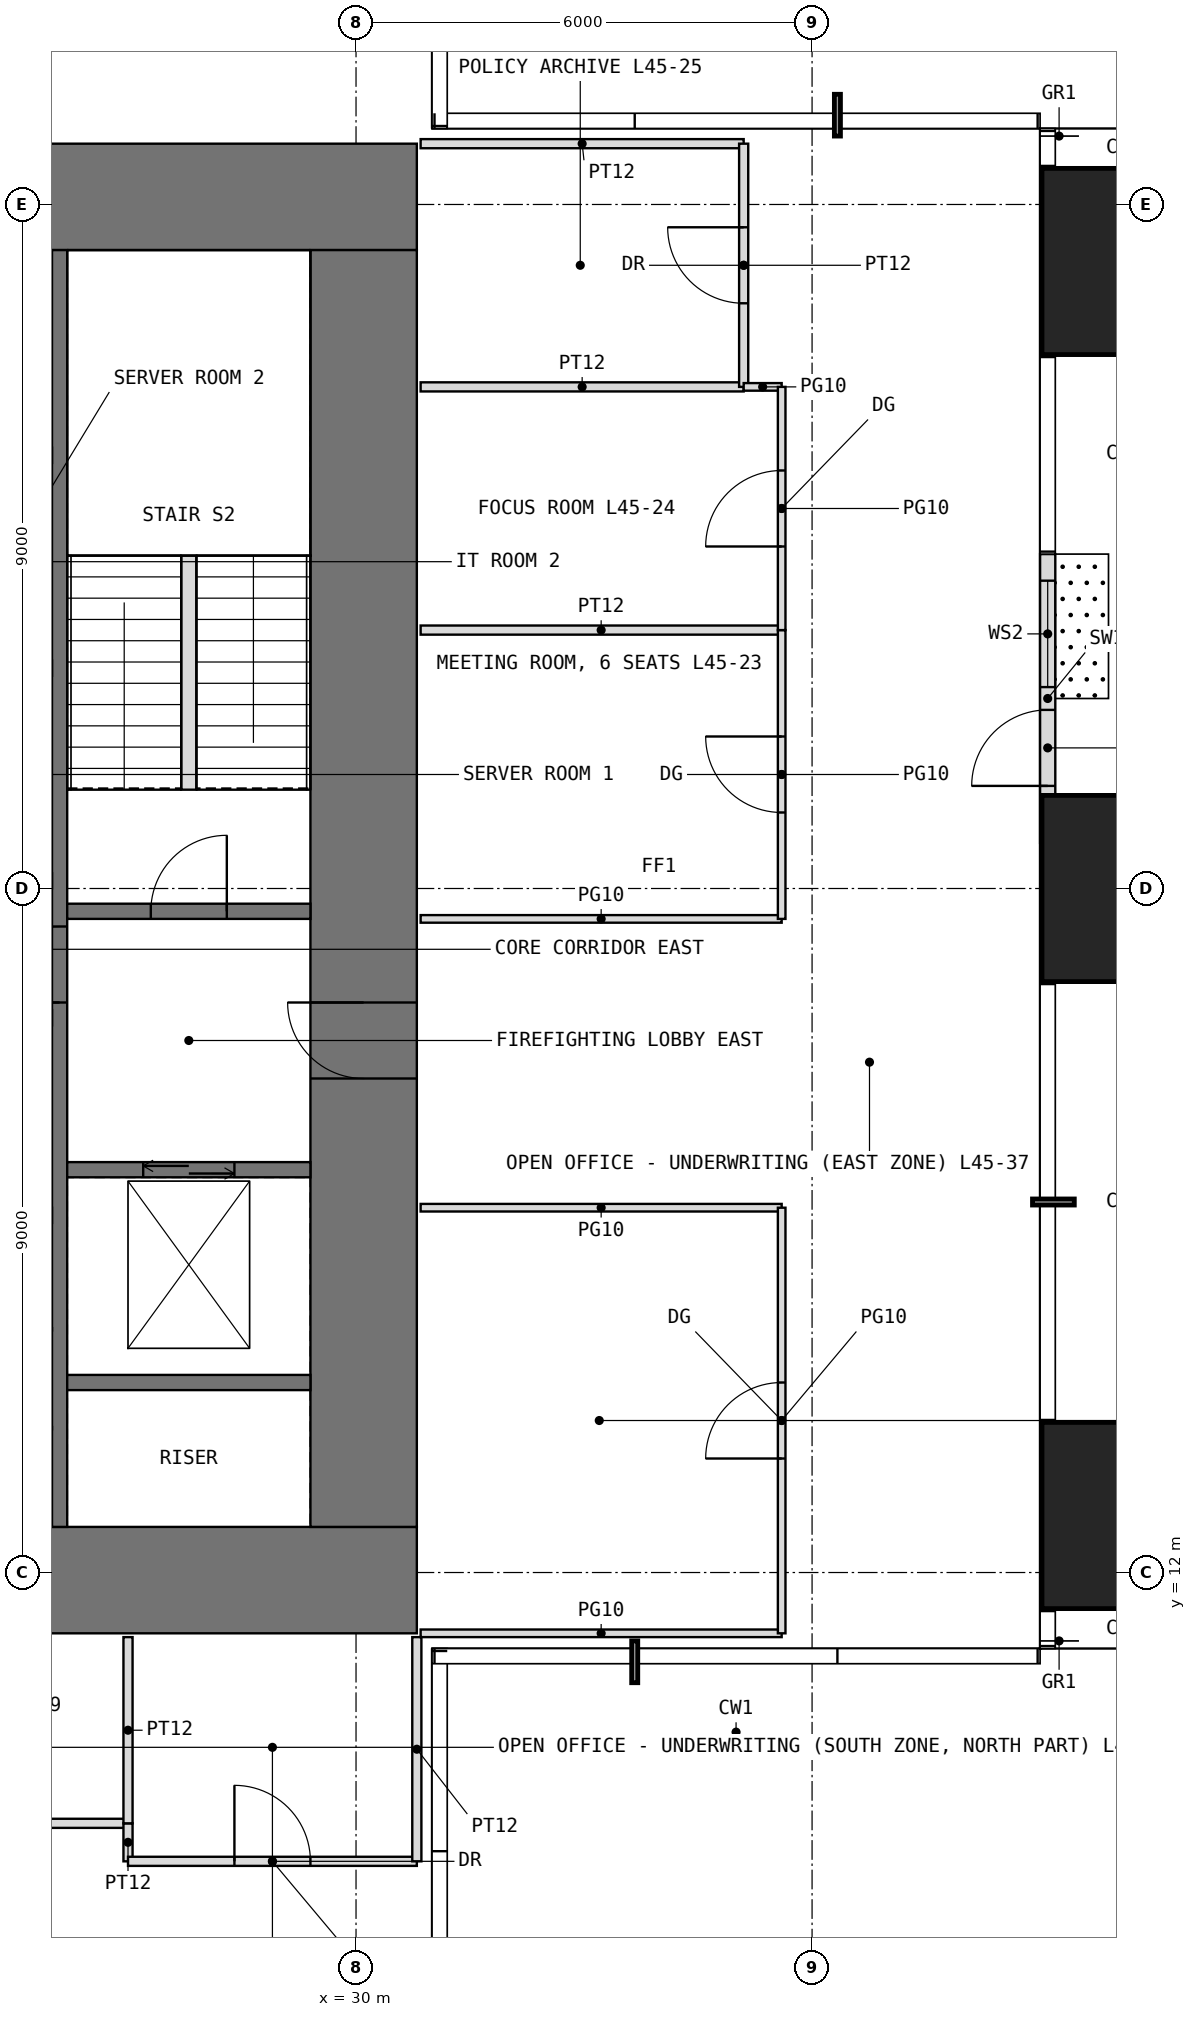
"""IFC4 building model, lengths in metres.
Left out: names, types, materials, properties, quantities, classifications, styles, units other than length and angle.
Written with IfcOpenShell. Run it as: python <this file> out.ifc"""

import sys

from ifc_helpers import new_model, si_unit, direction, frame, frame_2d, origin, origin_2d, place, context, subcontext, project, spatial, rectangle, extrude, element, fill, save


model = new_model("IFC4")
c1 = context("Model", 3, precision=1e-05, world=origin(), true_north=direction((0.0, 1.0)))
c2 = subcontext(c1, "Body", "Model", "MODEL_VIEW")
j1 = project(units=[si_unit("LENGTHUNIT", "METRE"), si_unit("PLANEANGLEUNIT", "RADIAN")], contexts=[c1])
p1 = place(None, origin())
s1 = spatial("IfcSite", under=j1, at=p1, CompositionType="ELEMENT")
p2 = place(p1, origin())
s2 = spatial("IfcBuilding", under=s1, at=p2, CompositionType="ELEMENT")
p3 = place(p2, frame((0.0, 0.0, 190.5)))
s3 = spatial("IfcBuildingStorey", under=s2, at=p3, CompositionType="ELEMENT", Elevation=190.5)
for number, where, z_axis, x_axis in (
    (1, (40.25, 12.75, 0.0), (0.0, 0.0, 1.0), (1.0, 0.0, 0.0)),
    (2, (40.25, 21.0, 0.0), (0.0, 0.0, 1.0), (1.0, 0.0, 0.0)),
    (3, (40.25, 29.25, 0.0), (0.0, 0.0, 1.0), (1.0, 0.0, 0.0)),
):
    element("IfcColumn", number, at=place(p3, frame(where, z_axis=z_axis, x_axis=x_axis)), inside=s3, PredefinedType="COLUMN", context=c2, shape_type="SweptSolid", body=[
        extrude(rectangle(XDim=2.45, YDim=2.45, at=origin_2d()), origin(), (0.0, 0.0, 1.0), 4.0),
    ])
p4 = place(p3, frame((39.1, 21.6, 0.0), z_axis=(0.0, 0.0, 1.0), x_axis=(0.0, 1.0, 0.0)))
e4 = element("IfcWall", 4, at=p4, inside=s3, PredefinedType="USERDEFINED", context=c2, shape_type="SweptSolid", body=[
    extrude(rectangle(XDim=3.8, YDim=0.2, at=frame_2d((1.9, 0.0))), origin(), (0.0, 0.0, 1.0), 3.75),
])
p5 = place(p4, frame((0.75, 0.0, 0.0)))
e5 = element("IfcOpeningElement", 5, at=p5, cuts=e4, PredefinedType="OPENING", context=c2, shape_type="SweptSolid", body=[
    extrude(rectangle(XDim=1.0, YDim=2.4, at=frame_2d((0.5, 1.2))), frame((0.0, 0.11, 0.0), z_axis=(0.0, -1.0, 0.0), x_axis=(1.0, 0.0, 0.0)), (0.0, 0.0, 1.0), 0.22),
])
p6 = place(p4, frame((2.05, 0.0, 0.3)))
e6 = element("IfcOpeningElement", 6, at=p6, cuts=e4, PredefinedType="OPENING", context=c2, shape_type="SweptSolid", body=[
    extrude(rectangle(XDim=1.4, YDim=2.7, at=frame_2d((0.7, 1.35))), frame((0.0, 0.11, 0.0), z_axis=(0.0, -1.0, 0.0), x_axis=(1.0, 0.0, 0.0)), (0.0, 0.0, 1.0), 0.22),
])
p7 = place(p3, frame((11.2, 11.9, -0.05), z_axis=(0.0, 0.0, 1.0), x_axis=(1.0, 0.0, 0.0)))
e7 = element("IfcWall", 7, at=p7, inside=s3, PredefinedType="SHEAR", context=c2, shape_type="SweptSolid", body=[
    extrude(rectangle(XDim=19.6, YDim=1.4, at=frame_2d((9.8, 0.0))), origin(), (0.0, 0.0, 1.0), 4.0),
])
p8 = place(p7, frame((8.8, 0.0, 0.05)))
e8 = element("IfcOpeningElement", 8, at=p8, cuts=e7, PredefinedType="OPENING", context=c2, shape_type="SweptSolid", body=[
    extrude(rectangle(XDim=2.0, YDim=2.2, at=frame_2d((1.0, 1.1))), frame((0.0, 0.71, 0.0), z_axis=(0.0, -1.0, 0.0), x_axis=(1.0, 0.0, 0.0)), (0.0, 0.0, 1.0), 1.42),
])
p9 = place(p3, frame((11.2, 30.1, -0.05), z_axis=(0.0, 0.0, 1.0), x_axis=(1.0, 0.0, 0.0)))
e9 = element("IfcWall", 9, at=p9, inside=s3, PredefinedType="SHEAR", context=c2, shape_type="SweptSolid", body=[
    extrude(rectangle(XDim=19.6, YDim=1.4, at=frame_2d((9.8, 0.0))), origin(), (0.0, 0.0, 1.0), 4.0),
])
p10 = place(p9, frame((8.8, 0.0, 0.05)))
e10 = element("IfcOpeningElement", 10, at=p10, cuts=e9, PredefinedType="OPENING", context=c2, shape_type="SweptSolid", body=[
    extrude(rectangle(XDim=2.0, YDim=2.2, at=frame_2d((1.0, 1.1))), frame((0.0, 0.71, 0.0), z_axis=(0.0, -1.0, 0.0), x_axis=(1.0, 0.0, 0.0)), (0.0, 0.0, 1.0), 1.42),
])
p11 = place(p3, frame((30.1, 12.6, -0.05), z_axis=(0.0, 0.0, 1.0), x_axis=(0.0, 1.0, 0.0)))
e11 = element("IfcWall", 11, at=p11, inside=s3, PredefinedType="SHEAR", context=c2, shape_type="SweptSolid", body=[
    extrude(rectangle(XDim=16.8, YDim=1.4, at=frame_2d((8.4, 0.0))), origin(), (0.0, 0.0, 1.0), 4.0),
])
p12 = place(p11, frame((5.9, 0.0, 0.05)))
e12 = element("IfcOpeningElement", 12, at=p12, cuts=e11, PredefinedType="OPENING", context=c2, shape_type="SweptSolid", body=[
    extrude(rectangle(XDim=1.0, YDim=2.2, at=frame_2d((0.5, 1.1))), frame((0.0, 0.71, 0.0), z_axis=(0.0, -1.0, 0.0), x_axis=(1.0, 0.0, 0.0)), (0.0, 0.0, 1.0), 1.42),
])
p13 = place(p3, frame((26.1, 12.6, -0.05), z_axis=(0.0, 0.0, 1.0), x_axis=(0.0, 1.0, 0.0)))
e13 = element("IfcWall", 13, at=p13, inside=s3, PredefinedType="SHEAR", context=c2, shape_type="SweptSolid", body=[
    extrude(rectangle(XDim=16.8, YDim=0.2, at=frame_2d((8.4, 0.0))), origin(), (0.0, 0.0, 1.0), 4.0),
])
p14 = place(p13, frame((6.9, 0.0, 0.05)))
e14 = element("IfcOpeningElement", 14, at=p14, cuts=e13, PredefinedType="OPENING", context=c2, shape_type="SweptSolid", body=[
    extrude(rectangle(XDim=1.0, YDim=2.2, at=frame_2d((0.5, 1.1))), frame((0.0, 0.11, 0.0), z_axis=(0.0, -1.0, 0.0), x_axis=(1.0, 0.0, 0.0)), (0.0, 0.0, 1.0), 0.22),
])
for number, where, z_axis, x_axis in (
    (15, (22.8, 16.7, -0.05), (0.0, 0.0, 1.0), (1.0, 0.0, 0.0)),
    (16, (22.8, 19.3, -0.05), (0.0, 0.0, 1.0), (1.0, 0.0, 0.0)),
    (17, (22.8, 21.1, -0.05), (0.0, 0.0, 1.0), (1.0, 0.0, 0.0)),
    (18, (22.8, 23.9, -0.05), (0.0, 0.0, 1.0), (1.0, 0.0, 0.0)),
    (19, (22.8, 26.7, -0.05), (0.0, 0.0, 1.0), (1.0, 0.0, 0.0)),
    (20, (26.2, 14.5, -0.05), (0.0, 0.0, 1.0), (1.0, 0.0, 0.0)),
):
    element("IfcWall", number, at=place(p3, frame(where, z_axis=z_axis, x_axis=x_axis)), inside=s3, PredefinedType="SHEAR", context=c2, shape_type="SweptSolid", body=[
        extrude(rectangle(XDim=3.2, YDim=0.2, at=frame_2d((1.6, 0.0))), origin(), (0.0, 0.0, 1.0), 4.0),
    ])
p15 = place(p3, frame((26.2, 17.3, -0.05), z_axis=(0.0, 0.0, 1.0), x_axis=(1.0, 0.0, 0.0)))
e21 = element("IfcWall", 21, at=p15, inside=s3, PredefinedType="SHEAR", context=c2, shape_type="SweptSolid", body=[
    extrude(rectangle(XDim=3.2, YDim=0.2, at=frame_2d((1.6, 0.0))), origin(), (0.0, 0.0, 1.0), 4.0),
])
p16 = place(p15, frame((1.0, 0.0, 0.05)))
e22 = element("IfcOpeningElement", 22, at=p16, cuts=e21, PredefinedType="OPENING", context=c2, shape_type="SweptSolid", body=[
    extrude(rectangle(XDim=1.2, YDim=2.2, at=frame_2d((0.6, 1.1))), frame((0.0, 0.11, 0.0), z_axis=(0.0, -1.0, 0.0), x_axis=(1.0, 0.0, 0.0)), (0.0, 0.0, 1.0), 0.22),
])
p17 = place(p3, frame((26.2, 20.7, -0.05), z_axis=(0.0, 0.0, 1.0), x_axis=(1.0, 0.0, 0.0)))
e23 = element("IfcWall", 23, at=p17, inside=s3, PredefinedType="SHEAR", context=c2, shape_type="SweptSolid", body=[
    extrude(rectangle(XDim=3.2, YDim=0.2, at=frame_2d((1.6, 0.0))), origin(), (0.0, 0.0, 1.0), 4.0),
])
p18 = place(p17, frame((1.1, 0.0, 0.05)))
e24 = element("IfcOpeningElement", 24, at=p18, cuts=e23, PredefinedType="OPENING", context=c2, shape_type="SweptSolid", body=[
    extrude(rectangle(XDim=1.0, YDim=2.2, at=frame_2d((0.5, 1.1))), frame((0.0, 0.11, 0.0), z_axis=(0.0, -1.0, 0.0), x_axis=(1.0, 0.0, 0.0)), (0.0, 0.0, 1.0), 0.22),
])
p19 = place(p3, frame((23.4, 8.7, 0.0), z_axis=(0.0, 0.0, 1.0), x_axis=(1.0, 0.0, 0.0)))
e25 = element("IfcWall", 25, at=p19, inside=s3, PredefinedType="PARTITIONING", context=c2, shape_type="SweptSolid", body=[
    extrude(rectangle(XDim=3.6, YDim=0.12, at=frame_2d((1.8, 0.0))), origin(), (0.0, 0.0, 1.0), 3.75),
])
p20 = place(p19, frame((1.3, 0.0, 0.0)))
e26 = element("IfcOpeningElement", 26, at=p20, cuts=e25, PredefinedType="OPENING", context=c2, shape_type="SweptSolid", body=[
    extrude(rectangle(XDim=1.0, YDim=2.2, at=frame_2d((0.5, 1.1))), frame((0.0, 0.07, 0.0), z_axis=(0.0, -1.0, 0.0), x_axis=(1.0, 0.0, 0.0)), (0.0, 0.0, 1.0), 0.14),
])
p21 = place(p3, frame((27.0, 8.2, 0.0), z_axis=(0.0, 0.0, 1.0), x_axis=(0.0, 1.0, 0.0)))
e27 = element("IfcWall", 27, at=p21, inside=s3, PredefinedType="PARTITIONING", context=c2, shape_type="SweptSolid", body=[
    extrude(rectangle(XDim=0.5, YDim=0.12, at=frame_2d((0.25, 0.0))), origin(), (0.0, 0.0, 1.0), 3.75),
])
p22 = place(p3, frame((27.0, 8.2, 0.0), z_axis=(0.0, 0.0, 1.0), x_axis=(1.0, 0.0, 0.0)))
e28 = element("IfcWall", 28, at=p22, inside=s3, PredefinedType="PARTITIONING", context=c2, shape_type="SweptSolid", body=[
    extrude(rectangle(XDim=3.8, YDim=0.12, at=frame_2d((1.9, 0.0))), origin(), (0.0, 0.0, 1.0), 3.75),
])
p23 = place(p22, frame((1.4, 0.0, 0.0)))
e29 = element("IfcOpeningElement", 29, at=p23, cuts=e28, PredefinedType="OPENING", context=c2, shape_type="SweptSolid", body=[
    extrude(rectangle(XDim=1.0, YDim=2.2, at=frame_2d((0.5, 1.1))), frame((0.0, 0.07, 0.0), z_axis=(0.0, -1.0, 0.0), x_axis=(1.0, 0.0, 0.0)), (0.0, 0.0, 1.0), 0.14),
])
p24 = place(p3, frame((27.0, 8.7, 0.0), z_axis=(0.0, 0.0, 1.0), x_axis=(0.0, 1.0, 0.0)))
e30 = element("IfcWall", 30, at=p24, inside=s3, PredefinedType="PARTITIONING", context=c2, shape_type="SweptSolid", body=[
    extrude(rectangle(XDim=2.45, YDim=0.12, at=frame_2d((1.225, 0.0))), origin(), (0.0, 0.0, 1.0), 3.75),
])
p25 = place(p3, frame((30.8, 8.2, 0.0), z_axis=(0.0, 0.0, 1.0), x_axis=(0.0, 1.0, 0.0)))
e31 = element("IfcWall", 31, at=p25, inside=s3, PredefinedType="PARTITIONING", context=c2, shape_type="SweptSolid", body=[
    extrude(rectangle(XDim=2.95, YDim=0.12, at=frame_2d((1.475, 0.0))), origin(), (0.0, 0.0, 1.0), 3.75),
])
for number, where, z_axis, x_axis in (
    (32, (30.85, 11.2, 0.0), (0.0, 0.0, 1.0), (1.0, 0.0, 0.0)),
    (33, (30.85, 16.8, 0.0), (0.0, 0.0, 1.0), (1.0, 0.0, 0.0)),
    (34, (30.85, 20.6, 0.0), (0.0, 0.0, 1.0), (1.0, 0.0, 0.0)),
):
    element("IfcWall", number, at=place(p3, frame(where, z_axis=z_axis, x_axis=x_axis)), inside=s3, PredefinedType="PARTITIONING", context=c2, shape_type="SweptSolid", body=[
        extrude(rectangle(XDim=4.75, YDim=0.1, at=frame_2d((2.375, 0.0))), origin(), (0.0, 0.0, 1.0), 3.75),
    ])
p26 = place(p3, frame((30.85, 24.4, 0.0), z_axis=(0.0, 0.0, 1.0), x_axis=(1.0, 0.0, 0.0)))
e35 = element("IfcWall", 35, at=p26, inside=s3, PredefinedType="PARTITIONING", context=c2, shape_type="SweptSolid", body=[
    extrude(rectangle(XDim=4.75, YDim=0.12, at=frame_2d((2.375, 0.0))), origin(), (0.0, 0.0, 1.0), 3.75),
])
for number, where, z_axis, x_axis in (
    (36, (30.85, 27.6, 0.0), (0.0, 0.0, 1.0), (1.0, 0.0, 0.0)),
    (37, (30.85, 30.8, 0.0), (0.0, 0.0, 1.0), (1.0, 0.0, 0.0)),
):
    element("IfcWall", number, at=place(p3, frame(where, z_axis=z_axis, x_axis=x_axis)), inside=s3, PredefinedType="PARTITIONING", context=c2, shape_type="SweptSolid", body=[
        extrude(rectangle(XDim=4.25, YDim=0.12, at=frame_2d((2.125, 0.0))), origin(), (0.0, 0.0, 1.0), 3.75),
    ])
p27 = place(p3, frame((35.1, 27.6, 0.0), z_axis=(0.0, 0.0, 1.0), x_axis=(0.0, 1.0, 0.0)))
e38 = element("IfcWall", 38, at=p27, inside=s3, PredefinedType="PARTITIONING", context=c2, shape_type="SweptSolid", body=[
    extrude(rectangle(XDim=3.2, YDim=0.12, at=frame_2d((1.6, 0.0))), origin(), (0.0, 0.0, 1.0), 3.75),
])
p28 = place(p27, frame((1.1, 0.0, 0.0)))
e39 = element("IfcOpeningElement", 39, at=p28, cuts=e38, PredefinedType="OPENING", context=c2, shape_type="SweptSolid", body=[
    extrude(rectangle(XDim=1.0, YDim=2.2, at=frame_2d((0.5, 1.1))), frame((0.0, 0.07, 0.0), z_axis=(0.0, -1.0, 0.0), x_axis=(1.0, 0.0, 0.0)), (0.0, 0.0, 1.0), 0.14),
])
p29 = place(p3, frame((35.1, 27.6, 0.0), z_axis=(0.0, 0.0, 1.0), x_axis=(1.0, 0.0, 0.0)))
e40 = element("IfcWall", 40, at=p29, inside=s3, PredefinedType="PARTITIONING", context=c2, shape_type="SweptSolid", body=[
    extrude(rectangle(XDim=0.5, YDim=0.1, at=frame_2d((0.25, 0.0))), origin(), (0.0, 0.0, 1.0), 3.75),
])
p30 = place(p3, frame((35.6, 11.2, 0.0), z_axis=(0.0, 0.0, 1.0), x_axis=(0.0, 1.0, 0.0)))
e41 = element("IfcWall", 41, at=p30, inside=s3, PredefinedType="PARTITIONING", context=c2, shape_type="SweptSolid", body=[
    extrude(rectangle(XDim=5.6, YDim=0.1, at=frame_2d((2.8, 0.0))), origin(), (0.0, 0.0, 1.0), 3.75),
])
p31 = place(p30, frame((2.3, 0.0, 0.0)))
e42 = element("IfcOpeningElement", 42, at=p31, cuts=e41, PredefinedType="OPENING", context=c2, shape_type="SweptSolid", body=[
    extrude(rectangle(XDim=1.0, YDim=2.4, at=frame_2d((0.5, 1.2))), frame((0.0, 0.06, 0.0), z_axis=(0.0, -1.0, 0.0), x_axis=(1.0, 0.0, 0.0)), (0.0, 0.0, 1.0), 0.12),
])
p32 = place(p3, frame((35.6, 20.6, 0.0), z_axis=(0.0, 0.0, 1.0), x_axis=(0.0, 1.0, 0.0)))
e43 = element("IfcWall", 43, at=p32, inside=s3, PredefinedType="PARTITIONING", context=c2, shape_type="SweptSolid", body=[
    extrude(rectangle(XDim=3.8, YDim=0.1, at=frame_2d((1.9, 0.0))), origin(), (0.0, 0.0, 1.0), 3.75),
])
p33 = place(p32, frame((1.4, 0.0, 0.0)))
e44 = element("IfcOpeningElement", 44, at=p33, cuts=e43, PredefinedType="OPENING", context=c2, shape_type="SweptSolid", body=[
    extrude(rectangle(XDim=1.0, YDim=2.4, at=frame_2d((0.5, 1.2))), frame((0.0, 0.06, 0.0), z_axis=(0.0, -1.0, 0.0), x_axis=(1.0, 0.0, 0.0)), (0.0, 0.0, 1.0), 0.12),
])
p34 = place(p3, frame((35.6, 24.4, 0.0), z_axis=(0.0, 0.0, 1.0), x_axis=(0.0, 1.0, 0.0)))
e45 = element("IfcWall", 45, at=p34, inside=s3, PredefinedType="PARTITIONING", context=c2, shape_type="SweptSolid", body=[
    extrude(rectangle(XDim=3.2, YDim=0.1, at=frame_2d((1.6, 0.0))), origin(), (0.0, 0.0, 1.0), 3.75),
])
p35 = place(p34, frame((1.1, 0.0, 0.0)))
e46 = element("IfcOpeningElement", 46, at=p35, cuts=e45, PredefinedType="OPENING", context=c2, shape_type="SweptSolid", body=[
    extrude(rectangle(XDim=1.0, YDim=2.4, at=frame_2d((0.5, 1.2))), frame((0.0, 0.06, 0.0), z_axis=(0.0, -1.0, 0.0), x_axis=(1.0, 0.0, 0.0)), (0.0, 0.0, 1.0), 0.12),
])
p36 = place(p3, frame((27.8, 22.3, 0.0), z_axis=(0.0, 0.0, 1.0), x_axis=(0.0, 1.0, 0.0)))
e47 = element("IfcWall", 47, at=p36, inside=s3, PredefinedType="PARTITIONING", context=c2, shape_type="SweptSolid", body=[
    extrude(rectangle(XDim=3.08, YDim=0.2, at=frame_2d((1.54, 0.0))), origin(), (0.0, 0.0, 1.0), 4.0),
])
p37 = place(p5, origin())
e48 = element("IfcDoor", 48, at=p37, inside=s3, OperationType="SINGLE_SWING_LEFT", PredefinedType="DOOR", context=c2, shape_type="SweptSolid", body=[
    extrude(rectangle(XDim=1.0, YDim=2.4, at=frame_2d((0.5, 1.2))), frame((0.0, 0.025, 0.0), z_axis=(0.0, -1.0, 0.0), x_axis=(1.0, 0.0, 0.0)), (0.0, 0.0, 1.0), 0.05),
])
fill(e5, e48)
p38 = place(p6, origin())
e49 = element("IfcWindow", 49, at=p38, inside=s3, PartitioningType="SINGLE_PANEL", PredefinedType="WINDOW", context=c2, shape_type="SweptSolid", body=[
    extrude(rectangle(XDim=1.4, YDim=2.7, at=frame_2d((0.7, 1.35))), frame((0.0, 0.03, 0.0), z_axis=(0.0, -1.0, 0.0), x_axis=(1.0, 0.0, 0.0)), (0.0, 0.0, 1.0), 0.06),
])
fill(e6, e49)
p39 = place(p12, origin())
e50 = element("IfcDoor", 50, at=p39, inside=s3, OperationType="SINGLE_SWING_RIGHT", PredefinedType="DOOR", context=c2, shape_type="SweptSolid", body=[
    extrude(rectangle(XDim=1.0, YDim=2.2, at=frame_2d((0.5, 1.1))), frame((0.0, 0.025, 0.0), z_axis=(0.0, -1.0, 0.0), x_axis=(1.0, 0.0, 0.0)), (0.0, 0.0, 1.0), 0.05),
])
fill(e12, e50)
p40 = place(p18, origin())
e51 = element("IfcDoor", 51, at=p40, inside=s3, OperationType="SINGLE_SWING_RIGHT", PredefinedType="DOOR", context=c2, shape_type="SweptSolid", body=[
    extrude(rectangle(XDim=1.0, YDim=2.2, at=frame_2d((0.5, 1.1))), frame((0.0, 0.025, 0.0), z_axis=(0.0, -1.0, 0.0), x_axis=(1.0, 0.0, 0.0)), (0.0, 0.0, 1.0), 0.05),
])
fill(e24, e51)
p41 = place(p14, origin())
e52 = element("IfcDoor", 52, at=p41, inside=s3, OperationType="SINGLE_SWING_LEFT", PredefinedType="DOOR", context=c2, shape_type="SweptSolid", body=[
    extrude(rectangle(XDim=1.0, YDim=2.2, at=frame_2d((0.5, 1.1))), frame((0.0, 0.025, 0.0), z_axis=(0.0, -1.0, 0.0), x_axis=(1.0, 0.0, 0.0)), (0.0, 0.0, 1.0), 0.05),
])
fill(e14, e52)
p42 = place(p23, origin())
e53 = element("IfcDoor", 53, at=p42, inside=s3, OperationType="SINGLE_SWING_LEFT", PredefinedType="DOOR", context=c2, shape_type="SweptSolid", body=[
    extrude(rectangle(XDim=1.0, YDim=2.2, at=frame_2d((0.5, 1.1))), frame((0.0, 0.025, 0.0), z_axis=(0.0, -1.0, 0.0), x_axis=(1.0, 0.0, 0.0)), (0.0, 0.0, 1.0), 0.05),
])
fill(e29, e53)
p43 = place(p31, origin())
e54 = element("IfcDoor", 54, at=p43, inside=s3, OperationType="SINGLE_SWING_LEFT", PredefinedType="DOOR", context=c2, shape_type="SweptSolid", body=[
    extrude(rectangle(XDim=1.0, YDim=2.4, at=frame_2d((0.5, 1.2))), frame((0.0, 0.025, 0.0), z_axis=(0.0, -1.0, 0.0), x_axis=(1.0, 0.0, 0.0)), (0.0, 0.0, 1.0), 0.05),
])
fill(e42, e54)
p44 = place(p33, origin())
e55 = element("IfcDoor", 55, at=p44, inside=s3, OperationType="SINGLE_SWING_RIGHT", PredefinedType="DOOR", context=c2, shape_type="SweptSolid", body=[
    extrude(rectangle(XDim=1.0, YDim=2.4, at=frame_2d((0.5, 1.2))), frame((0.0, 0.025, 0.0), z_axis=(0.0, -1.0, 0.0), x_axis=(1.0, 0.0, 0.0)), (0.0, 0.0, 1.0), 0.05),
])
fill(e44, e55)
p45 = place(p35, origin())
e56 = element("IfcDoor", 56, at=p45, inside=s3, OperationType="SINGLE_SWING_LEFT", PredefinedType="DOOR", context=c2, shape_type="SweptSolid", body=[
    extrude(rectangle(XDim=1.0, YDim=2.4, at=frame_2d((0.5, 1.2))), frame((0.0, 0.025, 0.0), z_axis=(0.0, -1.0, 0.0), x_axis=(1.0, 0.0, 0.0)), (0.0, 0.0, 1.0), 0.05),
])
fill(e46, e56)
p46 = place(p28, origin())
e57 = element("IfcDoor", 57, at=p46, inside=s3, OperationType="SINGLE_SWING_RIGHT", PredefinedType="DOOR", context=c2, shape_type="SweptSolid", body=[
    extrude(rectangle(XDim=1.0, YDim=2.2, at=frame_2d((0.5, 1.1))), frame((0.0, 0.025, 0.0), z_axis=(0.0, -1.0, 0.0), x_axis=(1.0, 0.0, 0.0)), (0.0, 0.0, 1.0), 0.05),
])
fill(e39, e57)
p47 = place(p16, origin())
e58 = element("IfcDoor", 58, at=p47, inside=s3, OperationType="DOUBLE_DOOR_SLIDING", PredefinedType="DOOR", context=c2, shape_type="SweptSolid", body=[
    extrude(rectangle(XDim=1.2, YDim=2.2, at=frame_2d((0.6, 1.1))), frame((0.0, 0.025, 0.0), z_axis=(0.0, -1.0, 0.0), x_axis=(1.0, 0.0, 0.0)), (0.0, 0.0, 1.0), 0.05),
])
fill(e22, e58)
save(model, sys.argv[1])
